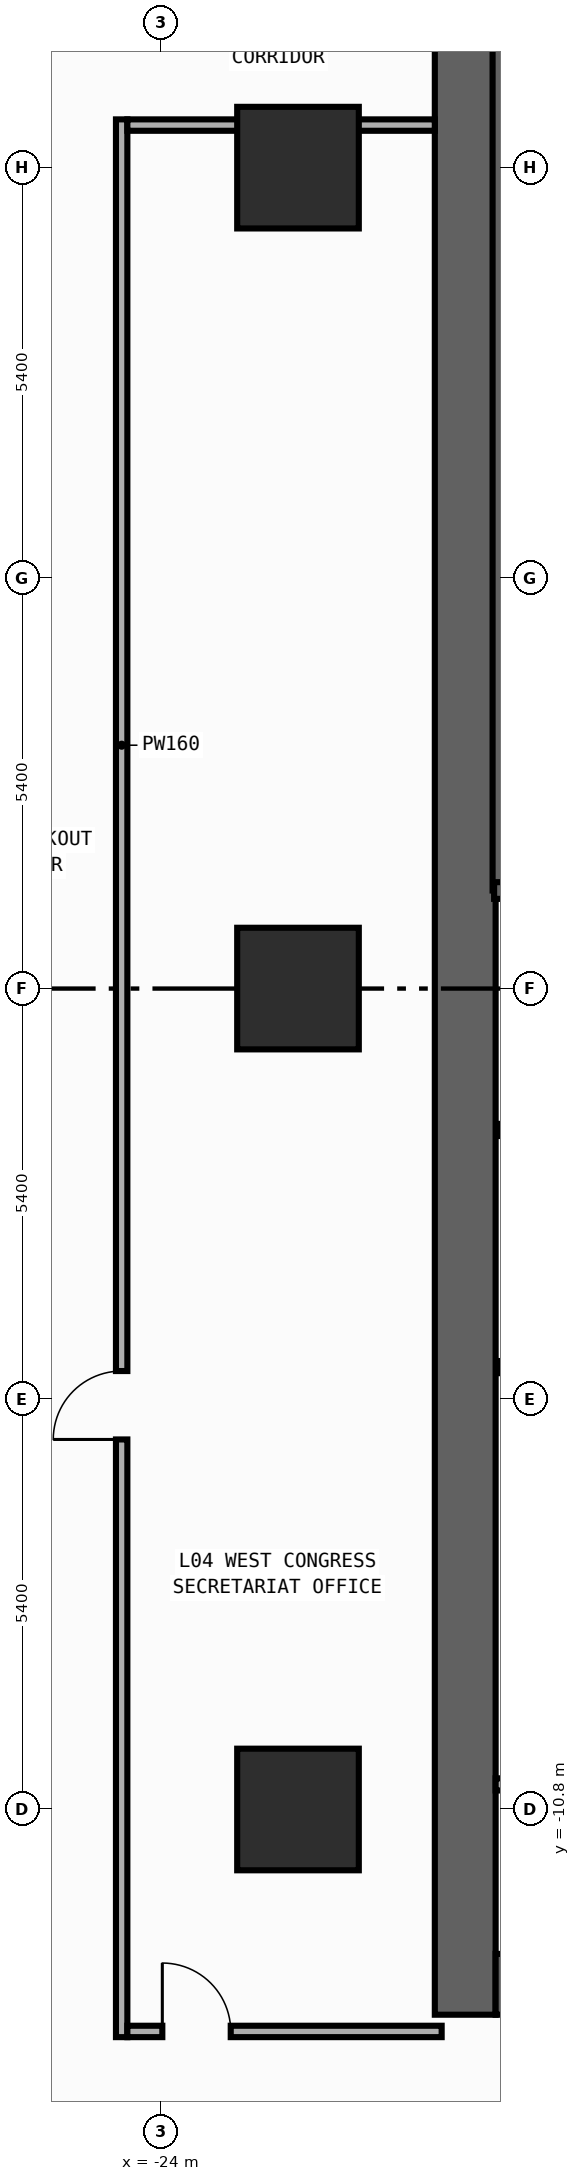
"""IFC4 building model, lengths in metres.
Left out: names, types, materials, properties, quantities, classifications, styles, units other than length and angle.
Written with IfcOpenShell. Run it as: python <this file> out.ifc"""

import sys

from ifc_helpers import new_model, si_unit, direction, frame, frame_2d, origin, origin_2d, place, context, subcontext, project, spatial, rectangle, extrude, element, fill, save


model = new_model("IFC4")
c1 = context("Model", 3, precision=1e-05, world=origin(), true_north=direction((0.0, 1.0)))
c2 = subcontext(c1, "Body", "Model", "MODEL_VIEW")
j1 = project(units=[si_unit("LENGTHUNIT", "METRE"), si_unit("PLANEANGLEUNIT", "RADIAN")], contexts=[c1])
p1 = place(None, origin())
s1 = spatial("IfcSite", under=j1, at=p1, CompositionType="ELEMENT")
p2 = place(p1, origin())
s2 = spatial("IfcBuilding", under=s1, at=p2, CompositionType="ELEMENT")
p3 = place(p2, frame((0.0, 0.0, 16.0)))
s3 = spatial("IfcBuildingStorey", under=s2, at=p3, CompositionType="ELEMENT", Elevation=16.0)
p4 = place(p3, frame((-20.0, -13.5, 0.0), z_axis=(0.0, 0.0, 1.0), x_axis=(0.0, 1.0, 0.0)))
e1 = element("IfcWall", 1, at=p4, inside=s3, PredefinedType="SHEAR", context=c2, shape_type="SweptSolid", body=[
    extrude(rectangle(XDim=27.0, YDim=0.8, at=frame_2d((13.5, 0.0))), origin(), (0.0, 0.0, 1.0), 4.55),
])
p5 = place(p3, frame((-19.6, -13.1, 0.0), z_axis=(0.0, 0.0, 1.0), x_axis=(1.0, 0.0, 0.0)))
e2 = element("IfcWall", 2, at=p5, inside=s3, PredefinedType="SHEAR", context=c2, shape_type="SweptSolid", body=[
    extrude(rectangle(XDim=6.8, YDim=0.8, at=frame_2d((3.4, 0.0))), origin(), (0.0, 0.0, 1.0), 4.55),
])
p6 = place(p3, frame((-19.53, 1.29, 0.0), z_axis=(0.0, 0.0, 1.0), x_axis=(0.0, 1.0, 0.0)))
e3 = element("IfcWall", 3, at=p6, inside=s3, PredefinedType="SHEAR", context=c2, shape_type="SweptSolid", body=[
    extrude(rectangle(XDim=11.3, YDim=0.22, at=frame_2d((5.65, 0.0))), origin(), (0.0, 0.0, 1.0), 4.55),
])
p7 = place(p3, frame((-19.62, 1.29, 0.0), z_axis=(0.0, 0.0, 1.0), x_axis=(1.0, 0.0, 0.0)))
e4 = element("IfcWall", 4, at=p7, inside=s3, PredefinedType="SHEAR", context=c2, shape_type="SweptSolid", body=[
    extrude(rectangle(XDim=3.915, YDim=0.22, at=frame_2d((1.958, 0.0))), origin(), (0.0, 0.0, 1.0), 4.55),
])
p8 = place(p7, frame((1.08, 0.0, 0.0)))
e5 = element("IfcOpeningElement", 5, at=p8, cuts=e4, PredefinedType="OPENING", context=c2, shape_type="SweptSolid", body=[
    extrude(rectangle(XDim=1.1, YDim=2.2, at=frame_2d((0.55, 1.1))), frame((0.0, 0.12, 0.0), z_axis=(0.0, -1.0, 0.0), x_axis=(1.0, 0.0, 0.0)), (0.0, 0.0, 1.0), 0.24),
])
for number, where, z_axis, x_axis in (
    (6, (-22.2, -10.8, 0.0), (0.0, 0.0, 1.0), (1.0, 0.0, 0.0)),
    (7, (-22.2, 0.0, 0.0), (0.0, 0.0, 1.0), (1.0, 0.0, 0.0)),
    (8, (-22.2, 10.8, 0.0), (0.0, 0.0, 1.0), (1.0, 0.0, 0.0)),
):
    element("IfcColumn", number, at=place(p3, frame(where, z_axis=z_axis, x_axis=x_axis)), inside=s3, PredefinedType="COLUMN", context=c2, shape_type="SweptSolid", body=[
        extrude(rectangle(XDim=1.6, YDim=1.6, at=origin_2d()), origin(), (0.0, 0.0, 1.0), 5.0),
    ])
p9 = place(p3, frame((-19.55, -1.86, 0.0), z_axis=(0.0, 0.0, 1.0), x_axis=(1.0, 0.0, 0.0)))
e9 = element("IfcWall", 9, at=p9, inside=s3, PredefinedType="STANDARD", context=c2, shape_type="SweptSolid", body=[
    extrude(rectangle(XDim=3.8, YDim=0.16, at=frame_2d((1.9, 0.0))), origin(), (0.0, 0.0, 1.0), 4.55),
])
p10 = place(p9, frame((1.18, 0.0, 0.0)))
e10 = element("IfcOpeningElement", 10, at=p10, cuts=e9, PredefinedType="OPENING", context=c2, shape_type="SweptSolid", body=[
    extrude(rectangle(XDim=1.15, YDim=2.2, at=frame_2d((0.575, 1.1))), frame((0.0, 0.09, 0.0), z_axis=(0.0, -1.0, 0.0), x_axis=(1.0, 0.0, 0.0)), (0.0, 0.0, 1.0), 0.18),
])
p11 = place(p3, frame((-19.55, -4.98, 0.0), z_axis=(0.0, 0.0, 1.0), x_axis=(1.0, 0.0, 0.0)))
e11 = element("IfcWall", 11, at=p11, inside=s3, PredefinedType="STANDARD", context=c2, shape_type="SweptSolid", body=[
    extrude(rectangle(XDim=3.8, YDim=0.16, at=frame_2d((1.9, 0.0))), origin(), (0.0, 0.0, 1.0), 4.55),
])
p12 = place(p3, frame((-19.6, -10.47, 0.0), z_axis=(0.0, 0.0, 1.0), x_axis=(1.0, 0.0, 0.0)))
e12 = element("IfcWall", 12, at=p12, inside=s3, PredefinedType="PARTITIONING", context=c2, shape_type="SweptSolid", body=[
    extrude(rectangle(XDim=2.29, YDim=0.16, at=frame_2d((1.145, 0.0))), origin(), (0.0, 0.0, 1.0), 4.55),
])
p13 = place(p3, frame((-24.52, -13.795, 0.0), z_axis=(0.0, 0.0, 1.0), x_axis=(0.0, 1.0, 0.0)))
e13 = element("IfcWall", 13, at=p13, inside=s3, PredefinedType="PARTITIONING", context=c2, shape_type="SweptSolid", body=[
    extrude(rectangle(XDim=25.23, YDim=0.15, at=frame_2d((12.615, 0.0))), origin(), (0.0, 0.0, 1.0), 4.55),
])
p14 = place(p13, frame((7.863, 0.0, 0.0)))
e14 = element("IfcOpeningElement", 14, at=p14, cuts=e13, PredefinedType="OPENING", context=c2, shape_type="SweptSolid", body=[
    extrude(rectangle(XDim=0.9, YDim=2.15, at=frame_2d((0.45, 1.075))), frame((0.0, 0.085, 0.0), z_axis=(0.0, -1.0, 0.0), x_axis=(1.0, 0.0, 0.0)), (0.0, 0.0, 1.0), 0.17),
])
p15 = place(p3, frame((-24.445, -13.72, 0.0), z_axis=(0.0, 0.0, 1.0), x_axis=(1.0, 0.0, 0.0)))
e15 = element("IfcWall", 15, at=p15, inside=s3, PredefinedType="PARTITIONING", context=c2, shape_type="SweptSolid", body=[
    extrude(rectangle(XDim=4.135, YDim=0.15, at=frame_2d((2.067, 0.0))), origin(), (0.0, 0.0, 1.0), 4.55),
])
p16 = place(p15, frame((0.46, 0.0, 0.0)))
e16 = element("IfcOpeningElement", 16, at=p16, cuts=e15, PredefinedType="OPENING", context=c2, shape_type="SweptSolid", body=[
    extrude(rectangle(XDim=0.9, YDim=2.15, at=frame_2d((0.45, 1.075))), frame((0.0, 0.085, 0.0), z_axis=(0.0, -1.0, 0.0), x_axis=(1.0, 0.0, 0.0)), (0.0, 0.0, 1.0), 0.17),
])
p17 = place(p3, frame((-24.445, 11.36, 0.0), z_axis=(0.0, 0.0, 1.0), x_axis=(1.0, 0.0, 0.0)))
e17 = element("IfcWall", 17, at=p17, inside=s3, PredefinedType="PARTITIONING", context=c2, shape_type="SweptSolid", body=[
    extrude(rectangle(XDim=4.045, YDim=0.15, at=frame_2d((2.022, 0.0))), origin(), (0.0, 0.0, 1.0), 4.55),
])
p18 = place(p14, origin())
e18 = element("IfcDoor", 18, at=p18, inside=s3, OperationType="SINGLE_SWING_LEFT", PredefinedType="DOOR", context=c2, shape_type="SweptSolid", body=[
    extrude(rectangle(XDim=0.9, YDim=2.15, at=frame_2d((0.45, 1.075))), frame((0.0, 0.025, 0.0), z_axis=(0.0, -1.0, 0.0), x_axis=(1.0, 0.0, 0.0)), (0.0, 0.0, 1.0), 0.05),
])
fill(e14, e18)
p19 = place(p16, origin())
e19 = element("IfcDoor", 19, at=p19, inside=s3, OperationType="SINGLE_SWING_LEFT", PredefinedType="DOOR", context=c2, shape_type="SweptSolid", body=[
    extrude(rectangle(XDim=0.9, YDim=2.15, at=frame_2d((0.45, 1.075))), frame((0.0, 0.025, 0.0), z_axis=(0.0, -1.0, 0.0), x_axis=(1.0, 0.0, 0.0)), (0.0, 0.0, 1.0), 0.05),
])
fill(e16, e19)
save(model, sys.argv[1])
